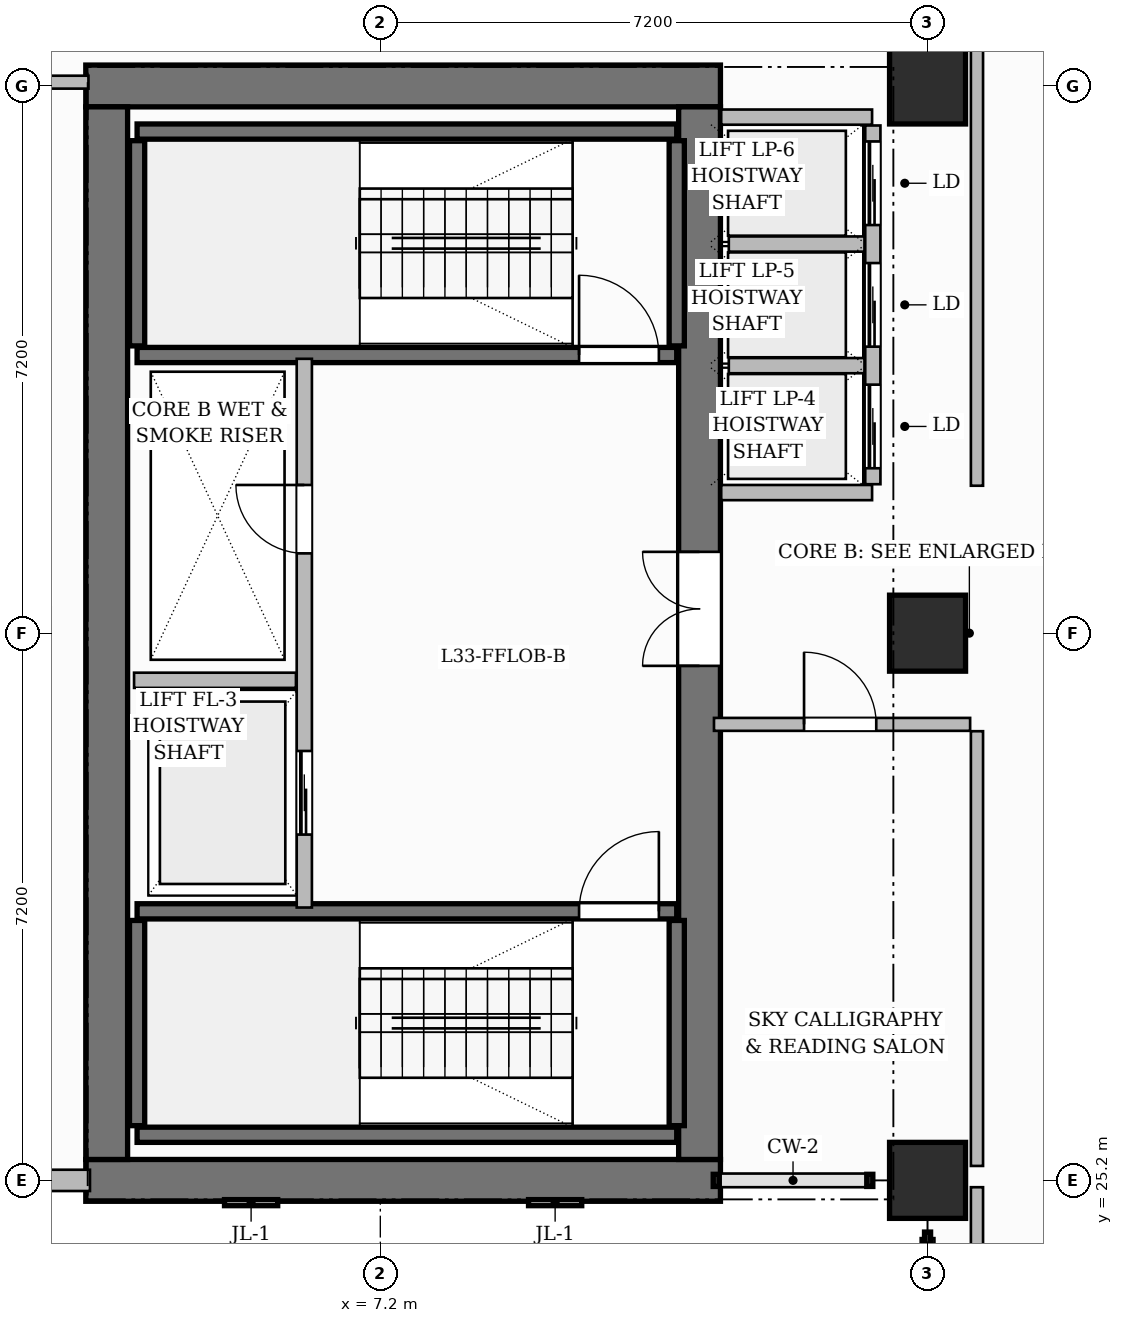
"""IFC4 building model, lengths in metres.
Left out: names, types, materials, properties, quantities, classifications, styles, units other than length and angle.
Written with IfcOpenShell. Run it as: python <this file> out.ifc"""

import sys

from ifc_helpers import new_model, si_unit, direction, frame, frame_2d, origin, origin_2d, place, context, subcontext, project, spatial, rectangle, extrude, source, transform, mapped, element, fill, save


model = new_model("IFC4")
c1 = context("Model", 3, precision=1e-05, world=origin(), true_north=direction((0.0, 1.0)))
c2 = subcontext(c1, "Body", "Model", "MODEL_VIEW")
j1 = project(units=[si_unit("LENGTHUNIT", "METRE"), si_unit("PLANEANGLEUNIT", "RADIAN")], contexts=[c1])
p1 = place(None, origin())
s1 = spatial("IfcSite", under=j1, at=p1, CompositionType="ELEMENT")
p2 = place(p1, origin())
s2 = spatial("IfcBuilding", under=s1, at=p2, CompositionType="ELEMENT")
p3 = place(p2, frame((0.0, 0.0, 134.0)))
s3 = spatial("IfcBuildingStorey", under=s2, at=p3, CompositionType="ELEMENT", Elevation=134.0)
for number, where, z_axis, x_axis in (
    (1, (3.325, 25.2, 0.0), (0.0, 0.0, 1.0), (1.0, 0.0, 0.0)),
    (2, (3.325, 39.6, 0.0), (0.0, 0.0, 1.0), (1.0, 0.0, 0.0)),
):
    element("IfcWall", number, at=place(p3, frame(where, z_axis=z_axis, x_axis=x_axis)), inside=s3, PredefinedType="SHEAR", context=c2, shape_type="SweptSolid", body=[
        extrude(rectangle(XDim=8.35, YDim=0.55, at=frame_2d((4.175, 0.0))), origin(), (0.0, 0.0, 1.0), 3.7),
    ])
p4 = place(p3, frame((3.6, 25.475, 0.0), z_axis=(0.0, 0.0, 1.0), x_axis=(0.0, 1.0, 0.0)))
e3 = element("IfcWall", 3, at=p4, inside=s3, PredefinedType="SHEAR", context=c2, shape_type="SweptSolid", body=[
    extrude(rectangle(XDim=13.85, YDim=0.55, at=frame_2d((6.925, 0.0))), origin(), (0.0, 0.0, 1.0), 3.7),
])
p5 = place(p3, frame((11.4, 25.475, 0.0), z_axis=(0.0, 0.0, 1.0), x_axis=(0.0, 1.0, 0.0)))
e4 = element("IfcWall", 4, at=p5, inside=s3, PredefinedType="SHEAR", context=c2, shape_type="SweptSolid", body=[
    extrude(rectangle(XDim=13.85, YDim=0.55, at=frame_2d((6.925, 0.0))), origin(), (0.0, 0.0, 1.0), 3.7),
])
p6 = place(p5, frame((6.495, 0.0, 0.0)))
e5 = element("IfcOpeningElement", 5, at=p6, cuts=e4, PredefinedType="OPENING", context=c2, shape_type="SweptSolid", body=[
    extrude(rectangle(XDim=1.5, YDim=2.2, at=frame_2d((0.75, 1.1))), frame((0.0, 0.285, 0.0), z_axis=(0.0, -1.0, 0.0), x_axis=(1.0, 0.0, 0.0)), (0.0, 0.0, 1.0), 0.57),
])
m1 = source(origin(), c2, "Body", "SweptSolid", [
    extrude(rectangle(XDim=1.0, YDim=1.0, at=origin_2d()), origin(), (0.0, 0.0, 1.0), 3.7),
])
for number, where, z_axis, x_axis in (
    (6, (14.4, 25.2, 0.0), (0.0, 0.0, 1.0), (1.0, 0.0, 0.0)),
    (7, (14.4, 32.4, 0.0), (0.0, 0.0, 1.0), (1.0, 0.0, 0.0)),
    (8, (14.4, 39.6, 0.0), (0.0, 0.0, 1.0), (1.0, 0.0, 0.0)),
):
    element("IfcColumn", number, at=place(p3, frame(where, z_axis=z_axis, x_axis=x_axis)), inside=s3, PredefinedType="COLUMN", context=c2, shape_type="MappedRepresentation", body=[
        mapped(m1, transform((0.0, 0.0, 0.0), scale=1.0)),
    ])
p7 = place(p3, frame((4.0, 25.8, 0.0), z_axis=(0.0, 0.0, 1.0), x_axis=(1.0, 0.0, 0.0)))
e9 = element("IfcWall", 9, at=p7, inside=s3, PredefinedType="SHEAR", context=c2, shape_type="SweptSolid", body=[
    extrude(rectangle(XDim=7.1, YDim=0.2, at=frame_2d((3.55, 0.0))), origin(), (0.0, 0.0, 1.0), 3.7),
])
for number, where, z_axis, x_axis in (
    (10, (4.0, 25.92, 0.0), (0.0, 0.0, 1.0), (0.0, 1.0, 0.0)),
    (11, (11.1, 25.92, 0.0), (0.0, 0.0, 1.0), (0.0, 1.0, 0.0)),
):
    element("IfcWall", number, at=place(p3, frame(where, z_axis=z_axis, x_axis=x_axis)), inside=s3, PredefinedType="SHEAR", context=c2, shape_type="SweptSolid", body=[
        extrude(rectangle(XDim=2.7, YDim=0.2, at=frame_2d((1.35, 0.0))), origin(), (0.0, 0.0, 1.0), 3.7),
    ])
p8 = place(p3, frame((4.0, 28.74, 0.0), z_axis=(0.0, 0.0, 1.0), x_axis=(1.0, 0.0, 0.0)))
e12 = element("IfcWall", 12, at=p8, inside=s3, PredefinedType="SHEAR", context=c2, shape_type="SweptSolid", body=[
    extrude(rectangle(XDim=7.1, YDim=0.2, at=frame_2d((3.55, 0.0))), origin(), (0.0, 0.0, 1.0), 3.7),
])
p9 = place(p8, frame((5.815, 0.0, 0.0)))
e13 = element("IfcOpeningElement", 13, at=p9, cuts=e12, PredefinedType="OPENING", context=c2, shape_type="SweptSolid", body=[
    extrude(rectangle(XDim=1.05, YDim=2.2, at=frame_2d((0.525, 1.1))), frame((0.0, 0.11, 0.0), z_axis=(0.0, -1.0, 0.0), x_axis=(1.0, 0.0, 0.0)), (0.0, 0.0, 1.0), 0.22),
])
p10 = place(p3, frame((4.0, 39.0, 0.0), z_axis=(0.0, 0.0, 1.0), x_axis=(1.0, 0.0, 0.0)))
e14 = element("IfcWall", 14, at=p10, inside=s3, PredefinedType="SHEAR", context=c2, shape_type="SweptSolid", body=[
    extrude(rectangle(XDim=7.1, YDim=0.2, at=frame_2d((3.55, 0.0))), origin(), (0.0, 0.0, 1.0), 3.7),
])
for number, where, z_axis, x_axis in (
    (15, (4.0, 36.18, 0.0), (0.0, 0.0, 1.0), (0.0, 1.0, 0.0)),
    (16, (11.1, 36.18, 0.0), (0.0, 0.0, 1.0), (0.0, 1.0, 0.0)),
):
    element("IfcWall", number, at=place(p3, frame(where, z_axis=z_axis, x_axis=x_axis)), inside=s3, PredefinedType="SHEAR", context=c2, shape_type="SweptSolid", body=[
        extrude(rectangle(XDim=2.7, YDim=0.2, at=frame_2d((1.35, 0.0))), origin(), (0.0, 0.0, 1.0), 3.7),
    ])
p11 = place(p3, frame((4.0, 36.06, 0.0), z_axis=(0.0, 0.0, 1.0), x_axis=(1.0, 0.0, 0.0)))
e17 = element("IfcWall", 17, at=p11, inside=s3, PredefinedType="SHEAR", context=c2, shape_type="SweptSolid", body=[
    extrude(rectangle(XDim=7.1, YDim=0.2, at=frame_2d((3.55, 0.0))), origin(), (0.0, 0.0, 1.0), 3.7),
])
p12 = place(p11, frame((5.815, 0.0, 0.0)))
e18 = element("IfcOpeningElement", 18, at=p12, cuts=e17, PredefinedType="OPENING", context=c2, shape_type="SweptSolid", body=[
    extrude(rectangle(XDim=1.05, YDim=2.2, at=frame_2d((0.525, 1.1))), frame((0.0, 0.11, 0.0), z_axis=(0.0, -1.0, 0.0), x_axis=(1.0, 0.0, 0.0)), (0.0, 0.0, 1.0), 0.22),
])
p13 = place(p3, frame((6.2, 28.79, 0.0), z_axis=(0.0, 0.0, 1.0), x_axis=(0.0, 1.0, 0.0)))
e19 = element("IfcWall", 19, at=p13, inside=s3, PredefinedType="PARTITIONING", context=c2, shape_type="SweptSolid", body=[
    extrude(rectangle(XDim=7.22, YDim=0.2, at=frame_2d((3.61, 0.0))), origin(), (0.0, 0.0, 1.0), 3.45),
])
p14 = place(p13, frame((4.66, 0.0, 0.0)))
e20 = element("IfcOpeningElement", 20, at=p14, cuts=e19, PredefinedType="OPENING", context=c2, shape_type="SweptSolid", body=[
    extrude(rectangle(XDim=0.9, YDim=2.1, at=frame_2d((0.45, 1.05))), frame((0.0, 0.11, 0.0), z_axis=(0.0, -1.0, 0.0), x_axis=(1.0, 0.0, 0.0)), (0.0, 0.0, 1.0), 0.22),
])
p15 = place(p13, frame((0.96, 0.0, 0.0)))
e21 = element("IfcOpeningElement", 21, at=p15, cuts=e19, PredefinedType="OPENING", context=c2, shape_type="SweptSolid", body=[
    extrude(rectangle(XDim=1.1, YDim=2.2, at=frame_2d((0.55, 1.1))), frame((0.0, 0.11, 0.0), z_axis=(0.0, -1.0, 0.0), x_axis=(1.0, 0.0, 0.0)), (0.0, 0.0, 1.0), 0.22),
])
p16 = place(p3, frame((3.96, 31.78, 0.0), z_axis=(0.0, 0.0, 1.0), x_axis=(1.0, 0.0, 0.0)))
e22 = element("IfcWall", 22, at=p16, inside=s3, PredefinedType="PARTITIONING", context=c2, shape_type="SweptSolid", body=[
    extrude(rectangle(XDim=2.13, YDim=0.2, at=frame_2d((1.065, 0.0))), origin(), (0.0, 0.0, 1.0), 3.45),
])
for number, where, z_axis, x_axis in (
    (23, (11.685, 34.25, 0.0), (0.0, 0.0, 1.0), (1.0, 0.0, 0.0)),
    (24, (11.685, 39.19, 0.0), (0.0, 0.0, 1.0), (1.0, 0.0, 0.0)),
):
    element("IfcWall", number, at=place(p3, frame(where, z_axis=z_axis, x_axis=x_axis)), inside=s3, PredefinedType="PARTITIONING", context=c2, shape_type="SweptSolid", body=[
        extrude(rectangle(XDim=1.985, YDim=0.2, at=frame_2d((0.992, 0.0))), origin(), (0.0, 0.0, 1.0), 3.45),
    ])
p17 = place(p3, frame((13.68, 34.36, 0.0), z_axis=(0.0, 0.0, 1.0), x_axis=(0.0, 1.0, 0.0)))
e25 = element("IfcWall", 25, at=p17, inside=s3, PredefinedType="PARTITIONING", context=c2, shape_type="SweptSolid", body=[
    extrude(rectangle(XDim=4.72, YDim=0.2, at=frame_2d((2.36, 0.0))), origin(), (0.0, 0.0, 1.0), 3.45),
])
p18 = place(p17, frame((0.21, 0.0, 0.0)))
e26 = element("IfcOpeningElement", 26, at=p18, cuts=e25, PredefinedType="OPENING", context=c2, shape_type="SweptSolid", body=[
    extrude(rectangle(XDim=1.1, YDim=2.2, at=frame_2d((0.55, 1.1))), frame((0.0, 0.11, 0.0), z_axis=(0.0, -1.0, 0.0), x_axis=(1.0, 0.0, 0.0)), (0.0, 0.0, 1.0), 0.22),
])
p19 = place(p17, frame((1.81, 0.0, 0.0)))
e27 = element("IfcOpeningElement", 27, at=p19, cuts=e25, PredefinedType="OPENING", context=c2, shape_type="SweptSolid", body=[
    extrude(rectangle(XDim=1.1, YDim=2.2, at=frame_2d((0.55, 1.1))), frame((0.0, 0.11, 0.0), z_axis=(0.0, -1.0, 0.0), x_axis=(1.0, 0.0, 0.0)), (0.0, 0.0, 1.0), 0.22),
])
p20 = place(p17, frame((3.41, 0.0, 0.0)))
e28 = element("IfcOpeningElement", 28, at=p20, cuts=e25, PredefinedType="OPENING", context=c2, shape_type="SweptSolid", body=[
    extrude(rectangle(XDim=1.1, YDim=2.2, at=frame_2d((0.55, 1.1))), frame((0.0, 0.11, 0.0), z_axis=(0.0, -1.0, 0.0), x_axis=(1.0, 0.0, 0.0)), (0.0, 0.0, 1.0), 0.22),
])
for number, where, z_axis, x_axis in (
    (29, (11.785, 35.92, 0.0), (0.0, 0.0, 1.0), (1.0, 0.0, 0.0)),
    (30, (11.785, 37.52, 0.0), (0.0, 0.0, 1.0), (1.0, 0.0, 0.0)),
):
    element("IfcWall", number, at=place(p3, frame(where, z_axis=z_axis, x_axis=x_axis)), inside=s3, PredefinedType="PARTITIONING", context=c2, shape_type="SweptSolid", body=[
        extrude(rectangle(XDim=1.785, YDim=0.2, at=frame_2d((0.893, 0.0))), origin(), (0.0, 0.0, 1.0), 3.45),
    ])
p21 = place(p3, frame((15.05, 11.56, 0.0), z_axis=(0.0, 0.0, 1.0), x_axis=(0.0, 1.0, 0.0)))
e31 = element("IfcWall", 31, at=p21, inside=s3, PredefinedType="PARTITIONING", context=c2, shape_type="SweptSolid", body=[
    extrude(rectangle(XDim=13.55, YDim=0.16, at=frame_2d((6.775, 0.0))), origin(), (0.0, 0.0, 1.0), 3.45),
])
p22 = place(p3, frame((0.24, 39.65, 0.0), z_axis=(0.0, 0.0, 1.0), x_axis=(1.0, 0.0, 0.0)))
e32 = element("IfcWall", 32, at=p22, inside=s3, PredefinedType="PARTITIONING", context=c2, shape_type="SweptSolid", body=[
    extrude(rectangle(XDim=3.12, YDim=0.17, at=frame_2d((1.56, 0.0))), origin(), (0.0, 0.0, 1.0), 3.45),
])
p23 = place(p22, frame((1.11, 0.0, 0.0)))
e33 = element("IfcOpeningElement", 33, at=p23, cuts=e32, PredefinedType="OPENING", context=c2, shape_type="SweptSolid", body=[
    extrude(rectangle(XDim=0.9, YDim=2.15, at=frame_2d((0.45, 1.075))), frame((0.0, 0.095, 0.0), z_axis=(0.0, -1.0, 0.0), x_axis=(1.0, 0.0, 0.0)), (0.0, 0.0, 1.0), 0.19),
])
p24 = place(p3, frame((15.05, 34.34, 0.0), z_axis=(0.0, 0.0, 1.0), x_axis=(0.0, 1.0, 0.0)))
e34 = element("IfcWall", 34, at=p24, inside=s3, PredefinedType="PARTITIONING", context=c2, shape_type="SweptSolid", body=[
    extrude(rectangle(XDim=12.312, YDim=0.16, at=frame_2d((6.156, 0.0))), origin(), (0.0, 0.0, 1.0), 3.45),
])
p25 = place(p24, frame((8.01, 0.0, 0.0)))
e35 = element("IfcOpeningElement", 35, at=p25, cuts=e34, PredefinedType="OPENING", context=c2, shape_type="SweptSolid", body=[
    extrude(rectangle(XDim=1.6, YDim=2.4, at=frame_2d((0.8, 1.2))), frame((0.0, 0.09, 0.0), z_axis=(0.0, -1.0, 0.0), x_axis=(1.0, 0.0, 0.0)), (0.0, 0.0, 1.0), 0.18),
])
p26 = place(p3, frame((15.05, 25.39, 0.0), z_axis=(0.0, 0.0, 1.0), x_axis=(0.0, 1.0, 0.0)))
e36 = element("IfcWall", 36, at=p26, inside=s3, PredefinedType="PARTITIONING", context=c2, shape_type="SweptSolid", body=[
    extrude(rectangle(XDim=5.72, YDim=0.16, at=frame_2d((2.86, 0.0))), origin(), (0.0, 0.0, 1.0), 3.45),
])
p27 = place(p3, frame((11.59, 31.2, 0.0), z_axis=(0.0, 0.0, 1.0), x_axis=(1.0, 0.0, 0.0)))
e37 = element("IfcWall", 37, at=p27, inside=s3, PredefinedType="PARTITIONING", context=c2, shape_type="SweptSolid", body=[
    extrude(rectangle(XDim=3.37, YDim=0.17, at=frame_2d((1.685, 0.0))), origin(), (0.0, 0.0, 1.0), 3.45),
])
p28 = place(p27, frame((1.185, 0.0, 0.0)))
e38 = element("IfcOpeningElement", 38, at=p28, cuts=e37, PredefinedType="OPENING", context=c2, shape_type="SweptSolid", body=[
    extrude(rectangle(XDim=0.95, YDim=2.15, at=frame_2d((0.475, 1.075))), frame((0.0, 0.095, 0.0), z_axis=(0.0, -1.0, 0.0), x_axis=(1.0, 0.0, 0.0)), (0.0, 0.0, 1.0), 0.19),
])
p29 = place(p3, frame((0.0, 25.2, 0.0), z_axis=(0.0, 0.0, 1.0), x_axis=(1.0, 0.0, 0.0)))
e39 = element("IfcWall", 39, at=p29, inside=s3, PredefinedType="SOLIDWALL", context=c2, shape_type="SweptSolid", body=[
    extrude(rectangle(XDim=3.38, YDim=0.28, at=frame_2d((1.69, 0.0))), origin(), (0.0, 0.0, 1.0), 3.45),
])
p30 = place(p29, frame((1.205, 0.0, 0.8)))
e40 = element("IfcOpeningElement", 40, at=p30, cuts=e39, PredefinedType="OPENING", context=c2, shape_type="SweptSolid", body=[
    extrude(rectangle(XDim=1.4, YDim=1.85, at=frame_2d((0.7, 0.925))), frame((0.0, 0.15, 0.0), z_axis=(0.0, -1.0, 0.0), x_axis=(1.0, 0.0, 0.0)), (0.0, 0.0, 1.0), 0.3),
])
m2 = source(origin(), c2, "Body", "SweptSolid", [
    extrude(rectangle(XDim=1.05, YDim=2.2, at=frame_2d((0.525, 1.1))), frame((0.0, 0.025, 0.0), z_axis=(0.0, -1.0, 0.0), x_axis=(1.0, 0.0, 0.0)), (0.0, 0.0, 1.0), 0.05),
])
p31 = place(p9, origin())
e41 = element("IfcDoor", 41, at=p31, inside=s3, OperationType="SINGLE_SWING_RIGHT", PredefinedType="DOOR", context=c2, shape_type="MappedRepresentation", body=[
    mapped(m2, transform((0.0, 0.0, 0.0), scale=1.0)),
])
fill(e13, e41)
p32 = place(p12, origin())
e42 = element("IfcDoor", 42, at=p32, inside=s3, OperationType="SINGLE_SWING_LEFT", PredefinedType="DOOR", context=c2, shape_type="MappedRepresentation", body=[
    mapped(m2, transform((0.0, 0.0, 0.0), scale=1.0)),
])
fill(e18, e42)
m3 = source(origin(), c2, "Body", "SweptSolid", [
    extrude(rectangle(XDim=0.9, YDim=2.1, at=frame_2d((0.45, 1.05))), frame((0.0, 0.025, 0.0), z_axis=(0.0, -1.0, 0.0), x_axis=(1.0, 0.0, 0.0)), (0.0, 0.0, 1.0), 0.05),
])
p33 = place(p14, origin())
e43 = element("IfcDoor", 43, at=p33, inside=s3, OperationType="SINGLE_SWING_RIGHT", PredefinedType="DOOR", context=c2, shape_type="MappedRepresentation", body=[
    mapped(m3, transform((0.0, 0.0, 0.0), scale=1.0)),
])
fill(e20, e43)
m4 = source(origin(), c2, "Body", "SweptSolid", [
    extrude(rectangle(XDim=1.5, YDim=2.2, at=frame_2d((0.75, 1.1))), frame((0.0, 0.025, 0.0), z_axis=(0.0, -1.0, 0.0), x_axis=(1.0, 0.0, 0.0)), (0.0, 0.0, 1.0), 0.05),
])
p34 = place(p6, origin())
e44 = element("IfcDoor", 44, at=p34, inside=s3, OperationType="DOUBLE_DOOR_SINGLE_SWING", PredefinedType="DOOR", context=c2, shape_type="MappedRepresentation", body=[
    mapped(m4, transform((0.0, 0.0, 0.0), scale=1.0)),
])
fill(e5, e44)
m5 = source(origin(), c2, "Body", "SweptSolid", [
    extrude(rectangle(XDim=0.95, YDim=2.15, at=frame_2d((0.475, 1.075))), frame((0.0, 0.025, 0.0), z_axis=(0.0, -1.0, 0.0), x_axis=(1.0, 0.0, 0.0)), (0.0, 0.0, 1.0), 0.05),
])
p35 = place(p28, origin())
e45 = element("IfcDoor", 45, at=p35, inside=s3, OperationType="SINGLE_SWING_LEFT", PredefinedType="DOOR", context=c2, shape_type="MappedRepresentation", body=[
    mapped(m5, transform((0.0, 0.0, 0.0), scale=1.0)),
])
fill(e38, e45)
m6 = source(origin(), c2, "Body", "SweptSolid", [
    extrude(rectangle(XDim=1.1, YDim=2.2, at=frame_2d((0.55, 1.1))), frame((0.0, 0.025, 0.0), z_axis=(0.0, -1.0, 0.0), x_axis=(1.0, 0.0, 0.0)), (0.0, 0.0, 1.0), 0.05),
])
p36 = place(p15, origin())
e46 = element("IfcDoor", 46, at=p36, inside=s3, OperationType="SLIDING_TO_LEFT", PredefinedType="DOOR", context=c2, shape_type="MappedRepresentation", body=[
    mapped(m6, transform((0.0, 0.0, 0.0), scale=1.0)),
])
fill(e21, e46)
p37 = place(p18, origin())
e47 = element("IfcDoor", 47, at=p37, inside=s3, OperationType="SLIDING_TO_LEFT", PredefinedType="DOOR", context=c2, shape_type="MappedRepresentation", body=[
    mapped(m6, transform((0.0, 0.0, 0.0), scale=1.0)),
])
fill(e26, e47)
p38 = place(p19, origin())
e48 = element("IfcDoor", 48, at=p38, inside=s3, OperationType="SLIDING_TO_LEFT", PredefinedType="DOOR", context=c2, shape_type="MappedRepresentation", body=[
    mapped(m6, transform((0.0, 0.0, 0.0), scale=1.0)),
])
fill(e27, e48)
p39 = place(p20, origin())
e49 = element("IfcDoor", 49, at=p39, inside=s3, OperationType="SLIDING_TO_LEFT", PredefinedType="DOOR", context=c2, shape_type="MappedRepresentation", body=[
    mapped(m6, transform((0.0, 0.0, 0.0), scale=1.0)),
])
fill(e28, e49)
save(model, sys.argv[1])
